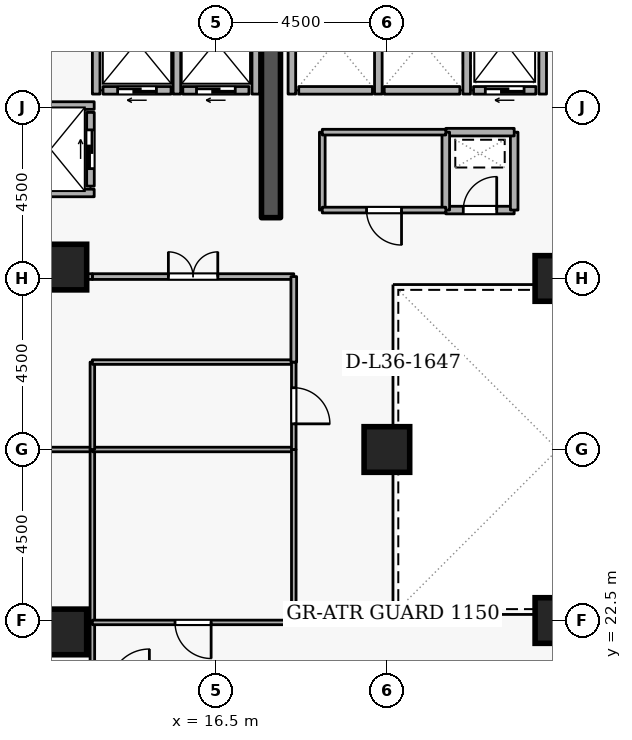
"""IFC4 building model, lengths in metres.
Left out: names, types, materials, properties, quantities, classifications, styles, units other than length and angle.
Written with IfcOpenShell. Run it as: python <this file> out.ifc"""

import sys

from ifc_helpers import new_model, si_unit, direction, frame, frame_2d, origin, origin_2d, place, context, subcontext, project, spatial, rectangle, extrude, element, fill, save


model = new_model("IFC4")
c1 = context("Model", 3, precision=1e-05, world=origin(), true_north=direction((0.0, 1.0)))
c2 = subcontext(c1, "Body", "Model", "MODEL_VIEW")
j1 = project(units=[si_unit("LENGTHUNIT", "METRE"), si_unit("PLANEANGLEUNIT", "RADIAN")], contexts=[c1])
p1 = place(None, origin())
s1 = spatial("IfcSite", under=j1, at=p1, CompositionType="ELEMENT")
p2 = place(p1, origin())
s2 = spatial("IfcBuilding", under=s1, at=p2, CompositionType="ELEMENT")
p3 = place(p2, frame((0.0, 0.0, 137.7)))
s3 = spatial("IfcBuildingStorey", under=s2, at=p3, CompositionType="ELEMENT", Elevation=137.7)
p4 = place(p3, frame((17.95, 33.1, 0.0), z_axis=(0.0, 0.0, 1.0), x_axis=(0.0, 1.0, 0.0)))
e1 = element("IfcWall", 1, at=p4, inside=s3, PredefinedType="SHEAR", context=c2, shape_type="SweptSolid", body=[
    extrude(rectangle(XDim=5.8, YDim=0.5, at=frame_2d((2.9, 0.0))), origin(), (0.0, 0.0, 1.0), 3.6),
])
for number, where, z_axis, x_axis in (
    (2, (12.5, 22.2, 0.0), (0.0, 0.0, 1.0), (1.0, 0.0, 0.0)),
    (3, (12.5, 31.8, 0.0), (0.0, 0.0, 1.0), (1.0, 0.0, 0.0)),
    (4, (25.5, 22.5, 0.0), (0.0, 0.0, 1.0), (1.0, 0.0, 0.0)),
    (5, (25.5, 31.5, 0.0), (0.0, 0.0, 1.0), (1.0, 0.0, 0.0)),
    (6, (21.0, 27.0, 0.0), (0.0, 0.0, 1.0), (1.0, 0.0, 0.0)),
):
    element("IfcColumn", number, at=place(p3, frame(where, z_axis=z_axis, x_axis=x_axis)), inside=s3, PredefinedType="COLUMN", context=c2, shape_type="SweptSolid", body=[
        extrude(rectangle(XDim=1.2, YDim=1.2, at=origin_2d()), origin(), (0.0, 0.0, 1.0), 3.6),
    ])
p5 = place(p3, frame((24.92, 36.45, 0.0), z_axis=(0.0, 0.0, 1.0), x_axis=(-1.0, 0.0, 0.0)))
e7 = element("IfcWall", 7, at=p5, inside=s3, PredefinedType="STANDARD", context=c2, shape_type="SweptSolid", body=[
    extrude(rectangle(XDim=1.64, YDim=0.2, at=frame_2d((0.82, 0.0))), origin(), (0.0, 0.0, 1.0), 3.26),
])
p6 = place(p5, frame((0.31, 0.0, 0.0)))
e8 = element("IfcOpeningElement", 8, at=p6, cuts=e7, PredefinedType="OPENING", context=c2, shape_type="SweptSolid", body=[
    extrude(rectangle(XDim=1.02, YDim=2.06, at=frame_2d((0.51, 1.03))), frame((0.0, 0.11, 0.0), z_axis=(0.0, -1.0, 0.0), x_axis=(1.0, 0.0, 0.0)), (0.0, 0.0, 1.0), 0.22),
])
p7 = place(p3, frame((22.92, 36.45, 0.0), z_axis=(0.0, 0.0, 1.0), x_axis=(-1.0, 0.0, 0.0)))
e9 = element("IfcWall", 9, at=p7, inside=s3, PredefinedType="STANDARD", context=c2, shape_type="SweptSolid", body=[
    extrude(rectangle(XDim=1.99, YDim=0.2, at=frame_2d((0.995, 0.0))), origin(), (0.0, 0.0, 1.0), 3.26),
])
p8 = place(p3, frame((20.62, 36.45, 0.0), z_axis=(0.0, 0.0, 1.0), x_axis=(-1.0, 0.0, 0.0)))
e10 = element("IfcWall", 10, at=p8, inside=s3, PredefinedType="STANDARD", context=c2, shape_type="SweptSolid", body=[
    extrude(rectangle(XDim=1.94, YDim=0.2, at=frame_2d((0.97, 0.0))), origin(), (0.0, 0.0, 1.0), 3.26),
])
p9 = place(p3, frame((17.37, 36.45, 0.0), z_axis=(0.0, 0.0, 1.0), x_axis=(-1.0, 0.0, 0.0)))
e11 = element("IfcWall", 11, at=p9, inside=s3, PredefinedType="STANDARD", context=c2, shape_type="SweptSolid", body=[
    extrude(rectangle(XDim=1.74, YDim=0.2, at=frame_2d((0.87, 0.0))), origin(), (0.0, 0.0, 1.0), 3.26),
])
p10 = place(p9, frame((0.36, 0.0, 0.0)))
e12 = element("IfcOpeningElement", 12, at=p10, cuts=e11, PredefinedType="OPENING", context=c2, shape_type="SweptSolid", body=[
    extrude(rectangle(XDim=1.02, YDim=2.06, at=frame_2d((0.51, 1.03))), frame((0.0, 0.11, 0.0), z_axis=(0.0, -1.0, 0.0), x_axis=(1.0, 0.0, 0.0)), (0.0, 0.0, 1.0), 0.22),
])
p11 = place(p3, frame((15.32, 36.45, 0.0), z_axis=(0.0, 0.0, 1.0), x_axis=(-1.0, 0.0, 0.0)))
e13 = element("IfcWall", 13, at=p11, inside=s3, PredefinedType="STANDARD", context=c2, shape_type="SweptSolid", body=[
    extrude(rectangle(XDim=1.79, YDim=0.2, at=frame_2d((0.895, 0.0))), origin(), (0.0, 0.0, 1.0), 3.26),
])
p12 = place(p11, frame((0.385, 0.0, 0.0)))
e14 = element("IfcOpeningElement", 14, at=p12, cuts=e13, PredefinedType="OPENING", context=c2, shape_type="SweptSolid", body=[
    extrude(rectangle(XDim=1.02, YDim=2.06, at=frame_2d((0.51, 1.03))), frame((0.0, 0.11, 0.0), z_axis=(0.0, -1.0, 0.0), x_axis=(1.0, 0.0, 0.0)), (0.0, 0.0, 1.0), 0.22),
])
p13 = place(p3, frame((13.2, 33.93, 0.0), z_axis=(0.0, 0.0, 1.0), x_axis=(0.0, 1.0, 0.0)))
e15 = element("IfcWall", 15, at=p13, inside=s3, PredefinedType="STANDARD", context=c2, shape_type="SweptSolid", body=[
    extrude(rectangle(XDim=1.94, YDim=0.2, at=frame_2d((0.97, 0.0))), origin(), (0.0, 0.0, 1.0), 3.26),
])
p14 = place(p13, frame((0.46, 0.0, 0.0)))
e16 = element("IfcOpeningElement", 16, at=p14, cuts=e15, PredefinedType="OPENING", context=c2, shape_type="SweptSolid", body=[
    extrude(rectangle(XDim=1.02, YDim=2.06, at=frame_2d((0.51, 1.03))), frame((0.0, 0.11, 0.0), z_axis=(0.0, -1.0, 0.0), x_axis=(1.0, 0.0, 0.0)), (0.0, 0.0, 1.0), 0.22),
])
for number, where, z_axis, x_axis in (
    (17, (25.1, 36.352, 0.0), (0.0, 0.0, 1.0), (0.0, 1.0, 0.0)),
    (18, (23.1, 36.352, 0.0), (0.0, 0.0, 1.0), (0.0, 1.0, 0.0)),
    (19, (20.775, 36.352, 0.0), (0.0, 0.0, 1.0), (0.0, 1.0, 0.0)),
    (20, (18.5, 36.352, 0.0), (0.0, 0.0, 1.0), (0.0, 1.0, 0.0)),
):
    element("IfcWall", number, at=place(p3, frame(where, z_axis=z_axis, x_axis=x_axis)), inside=s3, PredefinedType="STANDARD", context=c2, shape_type="SweptSolid", body=[
        extrude(rectangle(XDim=2.536, YDim=0.2, at=frame_2d((1.268, 0.0))), origin(), (0.0, 0.0, 1.0), 3.26),
    ])
p15 = place(p3, frame((17.55, 36.352, 0.0), z_axis=(0.0, 0.0, 1.0), x_axis=(0.0, 1.0, 0.0)))
e21 = element("IfcWall", 21, at=p15, inside=s3, PredefinedType="STANDARD", context=c2, shape_type="SweptSolid", body=[
    extrude(rectangle(XDim=2.636, YDim=0.2, at=frame_2d((1.318, 0.0))), origin(), (0.0, 0.0, 1.0), 2.465),
])
for number, where, z_axis, x_axis in (
    (22, (15.475, 36.352, 0.0), (0.0, 0.0, 1.0), (0.0, 1.0, 0.0)),
    (23, (13.35, 36.352, 0.0), (0.0, 0.0, 1.0), (0.0, 1.0, 0.0)),
):
    element("IfcWall", number, at=place(p3, frame(where, z_axis=z_axis, x_axis=x_axis)), inside=s3, PredefinedType="STANDARD", context=c2, shape_type="SweptSolid", body=[
        extrude(rectangle(XDim=2.636, YDim=0.2, at=frame_2d((1.318, 0.0))), origin(), (0.0, 0.0, 1.0), 3.26),
    ])
for number, where, z_axis, x_axis in (
    (24, (11.002, 36.05, 0.0), (0.0, 0.0, 1.0), (1.0, 0.0, 0.0)),
    (25, (11.002, 33.75, 0.0), (0.0, 0.0, 1.0), (1.0, 0.0, 0.0)),
):
    element("IfcWall", number, at=place(p3, frame(where, z_axis=z_axis, x_axis=x_axis)), inside=s3, PredefinedType="STANDARD", context=c2, shape_type="SweptSolid", body=[
        extrude(rectangle(XDim=2.296, YDim=0.2, at=frame_2d((1.148, 0.0))), origin(), (0.0, 0.0, 1.0), 3.26),
    ])
p16 = place(p3, frame((22.55, 33.3, 0.0), z_axis=(0.0, 0.0, 1.0), x_axis=(1.0, 0.0, 0.0)))
e26 = element("IfcWall", 26, at=p16, inside=s3, PredefinedType="STANDARD", context=c2, shape_type="SweptSolid", body=[
    extrude(rectangle(XDim=1.8, YDim=0.2, at=frame_2d((0.9, 0.0))), origin(), (0.0, 0.0, 1.0), 3.26),
])
p17 = place(p16, frame((0.46, 0.0, 0.0)))
e27 = element("IfcOpeningElement", 27, at=p17, cuts=e26, PredefinedType="OPENING", context=c2, shape_type="SweptSolid", body=[
    extrude(rectangle(XDim=0.88, YDim=2.04, at=frame_2d((0.44, 1.02))), frame((0.0, 0.11, 0.0), z_axis=(0.0, -1.0, 0.0), x_axis=(1.0, 0.0, 0.0)), (0.0, 0.0, 1.0), 0.22),
])
p18 = place(p3, frame((24.35, 33.3, 0.0), z_axis=(0.0, 0.0, 1.0), x_axis=(0.0, 1.0, 0.0)))
e28 = element("IfcWall", 28, at=p18, inside=s3, PredefinedType="STANDARD", context=c2, shape_type="SweptSolid", body=[
    extrude(rectangle(XDim=2.05, YDim=0.2, at=frame_2d((1.025, 0.0))), origin(), (0.0, 0.0, 1.0), 3.26),
])
p19 = place(p3, frame((24.35, 35.35, 0.0), z_axis=(0.0, 0.0, 1.0), x_axis=(-1.0, 0.0, 0.0)))
e29 = element("IfcWall", 29, at=p19, inside=s3, PredefinedType="STANDARD", context=c2, shape_type="SweptSolid", body=[
    extrude(rectangle(XDim=1.8, YDim=0.2, at=frame_2d((0.9, 0.0))), origin(), (0.0, 0.0, 1.0), 3.26),
])
p20 = place(p3, frame((22.55, 35.35, 0.0), z_axis=(0.0, 0.0, 1.0), x_axis=(0.0, -1.0, 0.0)))
e30 = element("IfcWall", 30, at=p20, inside=s3, PredefinedType="STANDARD", context=c2, shape_type="SweptSolid", body=[
    extrude(rectangle(XDim=2.05, YDim=0.2, at=frame_2d((1.025, 0.0))), origin(), (0.0, 0.0, 1.0), 3.26),
])
p21 = place(p3, frame((19.3, 33.3, 0.0), z_axis=(0.0, 0.0, 1.0), x_axis=(0.0, 1.0, 0.0)))
e31 = element("IfcWall", 31, at=p21, inside=s3, PredefinedType="PARTITIONING", context=c2, shape_type="SweptSolid", body=[
    extrude(rectangle(XDim=2.05, YDim=0.15, at=frame_2d((1.025, 0.0))), origin(), (0.0, 0.0, 1.0), 3.26),
])
p22 = place(p3, frame((19.3, 35.35, 0.0), z_axis=(0.0, 0.0, 1.0), x_axis=(1.0, 0.0, 0.0)))
e32 = element("IfcWall", 32, at=p22, inside=s3, PredefinedType="PARTITIONING", context=c2, shape_type="SweptSolid", body=[
    extrude(rectangle(XDim=3.25, YDim=0.15, at=frame_2d((1.625, 0.0))), origin(), (0.0, 0.0, 1.0), 3.26),
])
p23 = place(p3, frame((22.55, 33.3, 0.0), z_axis=(0.0, 0.0, 1.0), x_axis=(-1.0, 0.0, 0.0)))
e33 = element("IfcWall", 33, at=p23, inside=s3, PredefinedType="PARTITIONING", context=c2, shape_type="SweptSolid", body=[
    extrude(rectangle(XDim=3.25, YDim=0.15, at=frame_2d((1.625, 0.0))), origin(), (0.0, 0.0, 1.0), 3.26),
])
p24 = place(p23, frame((1.165, 0.0, 0.0)))
e34 = element("IfcOpeningElement", 34, at=p24, cuts=e33, PredefinedType="OPENING", context=c2, shape_type="SweptSolid", body=[
    extrude(rectangle(XDim=0.92, YDim=2.08, at=frame_2d((0.46, 1.04))), frame((0.0, 0.085, 0.0), z_axis=(0.0, -1.0, 0.0), x_axis=(1.0, 0.0, 0.0)), (0.0, 0.0, 1.0), 0.17),
])
p25 = place(p3, frame((13.25, 22.45, 0.0), z_axis=(0.0, 0.0, 1.0), x_axis=(0.0, -1.0, 0.0)))
e35 = element("IfcWall", 35, at=p25, inside=s3, PredefinedType="PARTITIONING", context=c2, shape_type="SweptSolid", body=[
    extrude(rectangle(XDim=1.75, YDim=0.12, at=frame_2d((0.875, 0.0))), origin(), (0.0, 0.0, 1.0), 3.26),
])
p26 = place(p3, frame((1.78, 27.0, 0.0), z_axis=(0.0, 0.0, 1.0), x_axis=(1.0, 0.0, 0.0)))
e36 = element("IfcWall", 36, at=p26, inside=s3, PredefinedType="PARTITIONING", context=c2, shape_type="SweptSolid", body=[
    extrude(rectangle(XDim=11.47, YDim=0.12, at=frame_2d((5.735, 0.0))), origin(), (0.0, 0.0, 1.0), 2.802),
])
p27 = place(p3, frame((13.25, 27.0, 0.0), z_axis=(0.0, 0.0, 1.0), x_axis=(0.0, -1.0, 0.0)))
e37 = element("IfcWall", 37, at=p27, inside=s3, PredefinedType="PARTITIONING", context=c2, shape_type="SweptSolid", body=[
    extrude(rectangle(XDim=4.55, YDim=0.12, at=frame_2d((2.275, 0.0))), origin(), (0.0, 0.0, 1.0), 3.26),
])
p28 = place(p3, frame((13.25, 27.0, 0.0), z_axis=(0.0, 0.0, 1.0), x_axis=(1.0, 0.0, 0.0)))
e38 = element("IfcWall", 38, at=p28, inside=s3, PredefinedType="PARTITIONING", context=c2, shape_type="SweptSolid", body=[
    extrude(rectangle(XDim=5.3, YDim=0.12, at=frame_2d((2.65, 0.0))), origin(), (0.0, 0.0, 1.0), 3.26),
])
p29 = place(p3, frame((18.55, 27.0, 0.0), z_axis=(0.0, 0.0, 1.0), x_axis=(0.0, -1.0, 0.0)))
e39 = element("IfcWall", 39, at=p29, inside=s3, PredefinedType="PARTITIONING", context=c2, shape_type="SweptSolid", body=[
    extrude(rectangle(XDim=4.55, YDim=0.12, at=frame_2d((2.275, 0.0))), origin(), (0.0, 0.0, 1.0), 3.26),
])
p30 = place(p3, frame((18.55, 22.45, 0.0), z_axis=(0.0, 0.0, 1.0), x_axis=(-1.0, 0.0, 0.0)))
e40 = element("IfcWall", 40, at=p30, inside=s3, PredefinedType="PARTITIONING", context=c2, shape_type="SweptSolid", body=[
    extrude(rectangle(XDim=5.3, YDim=0.12, at=frame_2d((2.65, 0.0))), origin(), (0.0, 0.0, 1.0), 3.26),
])
p31 = place(p30, frame((2.175, 0.0, 0.0)))
e41 = element("IfcOpeningElement", 41, at=p31, cuts=e40, PredefinedType="OPENING", context=c2, shape_type="SweptSolid", body=[
    extrude(rectangle(XDim=0.95, YDim=2.1, at=frame_2d((0.475, 1.05))), frame((0.0, 0.07, 0.0), z_axis=(0.0, -1.0, 0.0), x_axis=(1.0, 0.0, 0.0)), (0.0, 0.0, 1.0), 0.14),
])
p32 = place(p3, frame((13.25, 27.0, 0.0), z_axis=(0.0, 0.0, 1.0), x_axis=(0.0, 1.0, 0.0)))
e42 = element("IfcWall", 42, at=p32, inside=s3, PredefinedType="PARTITIONING", context=c2, shape_type="SweptSolid", body=[
    extrude(rectangle(XDim=2.3, YDim=0.12, at=frame_2d((1.15, 0.0))), origin(), (0.0, 0.0, 1.0), 3.26),
])
p33 = place(p3, frame((13.25, 29.3, 0.0), z_axis=(0.0, 0.0, 1.0), x_axis=(1.0, 0.0, 0.0)))
e43 = element("IfcWall", 43, at=p33, inside=s3, PredefinedType="PARTITIONING", context=c2, shape_type="SweptSolid", body=[
    extrude(rectangle(XDim=5.3, YDim=0.12, at=frame_2d((2.65, 0.0))), origin(), (0.0, 0.0, 1.0), 3.26),
])
p34 = place(p3, frame((18.55, 29.3, 0.0), z_axis=(0.0, 0.0, 1.0), x_axis=(0.0, -1.0, 0.0)))
e44 = element("IfcWall", 44, at=p34, inside=s3, PredefinedType="PARTITIONING", context=c2, shape_type="SweptSolid", body=[
    extrude(rectangle(XDim=2.3, YDim=0.12, at=frame_2d((1.15, 0.0))), origin(), (0.0, 0.0, 1.0), 3.26),
])
p35 = place(p34, frame((0.675, 0.0, 0.0)))
e45 = element("IfcOpeningElement", 45, at=p35, cuts=e44, PredefinedType="OPENING", context=c2, shape_type="SweptSolid", body=[
    extrude(rectangle(XDim=0.95, YDim=2.1, at=frame_2d((0.475, 1.05))), frame((0.0, 0.07, 0.0), z_axis=(0.0, -1.0, 0.0), x_axis=(1.0, 0.0, 0.0)), (0.0, 0.0, 1.0), 0.14),
])
p36 = place(p3, frame((13.25, 31.55, 0.0), z_axis=(0.0, 0.0, 1.0), x_axis=(1.0, 0.0, 0.0)))
e46 = element("IfcWall", 46, at=p36, inside=s3, PredefinedType="PARTITIONING", context=c2, shape_type="SweptSolid", body=[
    extrude(rectangle(XDim=5.3, YDim=0.15, at=frame_2d((2.65, 0.0))), origin(), (0.0, 0.0, 1.0), 3.26),
])
p37 = place(p36, frame((2.0, 0.0, 0.0)))
e47 = element("IfcOpeningElement", 47, at=p37, cuts=e46, PredefinedType="OPENING", context=c2, shape_type="SweptSolid", body=[
    extrude(rectangle(XDim=1.3, YDim=2.12, at=frame_2d((0.65, 1.06))), frame((0.0, 0.085, 0.0), z_axis=(0.0, -1.0, 0.0), x_axis=(1.0, 0.0, 0.0)), (0.0, 0.0, 1.0), 0.17),
])
p38 = place(p3, frame((18.55, 31.55, 0.0), z_axis=(0.0, 0.0, 1.0), x_axis=(0.0, -1.0, 0.0)))
e48 = element("IfcWall", 48, at=p38, inside=s3, PredefinedType="PARTITIONING", context=c2, shape_type="SweptSolid", body=[
    extrude(rectangle(XDim=2.25, YDim=0.15, at=frame_2d((1.125, 0.0))), origin(), (0.0, 0.0, 1.0), 3.26),
])
p39 = place(p3, frame((10.9, 31.55, 0.0), z_axis=(0.0, 0.0, 1.0), x_axis=(1.0, 0.0, 0.0)))
e49 = element("IfcWall", 49, at=p39, inside=s3, PredefinedType="PARTITIONING", context=c2, shape_type="SweptSolid", body=[
    extrude(rectangle(XDim=2.35, YDim=0.15, at=frame_2d((1.175, 0.0))), origin(), (0.0, 0.0, 1.0), 3.26),
])
p40 = place(p6, origin())
e50 = element("IfcDoor", 50, at=p40, inside=s3, OperationType="SLIDING_TO_LEFT", PredefinedType="DOOR", context=c2, shape_type="SweptSolid", body=[
    extrude(rectangle(XDim=1.02, YDim=2.06, at=frame_2d((0.51, 1.03))), frame((0.0, 0.025, 0.0), z_axis=(0.0, -1.0, 0.0), x_axis=(1.0, 0.0, 0.0)), (0.0, 0.0, 1.0), 0.05),
])
fill(e8, e50)
p41 = place(p10, origin())
e51 = element("IfcDoor", 51, at=p41, inside=s3, OperationType="SLIDING_TO_LEFT", PredefinedType="DOOR", context=c2, shape_type="SweptSolid", body=[
    extrude(rectangle(XDim=1.02, YDim=2.06, at=frame_2d((0.51, 1.03))), frame((0.0, 0.025, 0.0), z_axis=(0.0, -1.0, 0.0), x_axis=(1.0, 0.0, 0.0)), (0.0, 0.0, 1.0), 0.05),
])
fill(e12, e51)
p42 = place(p12, origin())
e52 = element("IfcDoor", 52, at=p42, inside=s3, OperationType="SLIDING_TO_LEFT", PredefinedType="DOOR", context=c2, shape_type="SweptSolid", body=[
    extrude(rectangle(XDim=1.02, YDim=2.06, at=frame_2d((0.51, 1.03))), frame((0.0, 0.025, 0.0), z_axis=(0.0, -1.0, 0.0), x_axis=(1.0, 0.0, 0.0)), (0.0, 0.0, 1.0), 0.05),
])
fill(e14, e52)
p43 = place(p14, origin())
e53 = element("IfcDoor", 53, at=p43, inside=s3, OperationType="SLIDING_TO_LEFT", PredefinedType="DOOR", context=c2, shape_type="SweptSolid", body=[
    extrude(rectangle(XDim=1.02, YDim=2.06, at=frame_2d((0.51, 1.03))), frame((0.0, 0.025, 0.0), z_axis=(0.0, -1.0, 0.0), x_axis=(1.0, 0.0, 0.0)), (0.0, 0.0, 1.0), 0.05),
])
fill(e16, e53)
p44 = place(p17, origin())
e54 = element("IfcDoor", 54, at=p44, inside=s3, OperationType="SINGLE_SWING_RIGHT", PredefinedType="DOOR", context=c2, shape_type="SweptSolid", body=[
    extrude(rectangle(XDim=0.88, YDim=2.04, at=frame_2d((0.44, 1.02))), frame((0.0, 0.025, 0.0), z_axis=(0.0, -1.0, 0.0), x_axis=(1.0, 0.0, 0.0)), (0.0, 0.0, 1.0), 0.05),
])
fill(e27, e54)
p45 = place(p24, origin())
e55 = element("IfcDoor", 55, at=p45, inside=s3, OperationType="SINGLE_SWING_LEFT", PredefinedType="DOOR", context=c2, shape_type="SweptSolid", body=[
    extrude(rectangle(XDim=0.92, YDim=2.08, at=frame_2d((0.46, 1.04))), frame((0.0, 0.025, 0.0), z_axis=(0.0, -1.0, 0.0), x_axis=(1.0, 0.0, 0.0)), (0.0, 0.0, 1.0), 0.05),
])
fill(e34, e55)
p46 = place(p31, origin())
e56 = element("IfcDoor", 56, at=p46, inside=s3, OperationType="SINGLE_SWING_LEFT", PredefinedType="DOOR", context=c2, shape_type="SweptSolid", body=[
    extrude(rectangle(XDim=0.95, YDim=2.1, at=frame_2d((0.475, 1.05))), frame((0.0, 0.025, 0.0), z_axis=(0.0, -1.0, 0.0), x_axis=(1.0, 0.0, 0.0)), (0.0, 0.0, 1.0), 0.05),
])
fill(e41, e56)
p47 = place(p35, origin())
e57 = element("IfcDoor", 57, at=p47, inside=s3, OperationType="SINGLE_SWING_RIGHT", PredefinedType="DOOR", context=c2, shape_type="SweptSolid", body=[
    extrude(rectangle(XDim=0.95, YDim=2.1, at=frame_2d((0.475, 1.05))), frame((0.0, 0.025, 0.0), z_axis=(0.0, -1.0, 0.0), x_axis=(1.0, 0.0, 0.0)), (0.0, 0.0, 1.0), 0.05),
])
fill(e45, e57)
p48 = place(p37, origin())
e58 = element("IfcDoor", 58, at=p48, inside=s3, OperationType="DOUBLE_DOOR_SINGLE_SWING", PredefinedType="DOOR", context=c2, shape_type="SweptSolid", body=[
    extrude(rectangle(XDim=1.3, YDim=2.12, at=frame_2d((0.65, 1.06))), frame((0.0, 0.025, 0.0), z_axis=(0.0, -1.0, 0.0), x_axis=(1.0, 0.0, 0.0)), (0.0, 0.0, 1.0), 0.05),
])
fill(e47, e58)
save(model, sys.argv[1])
